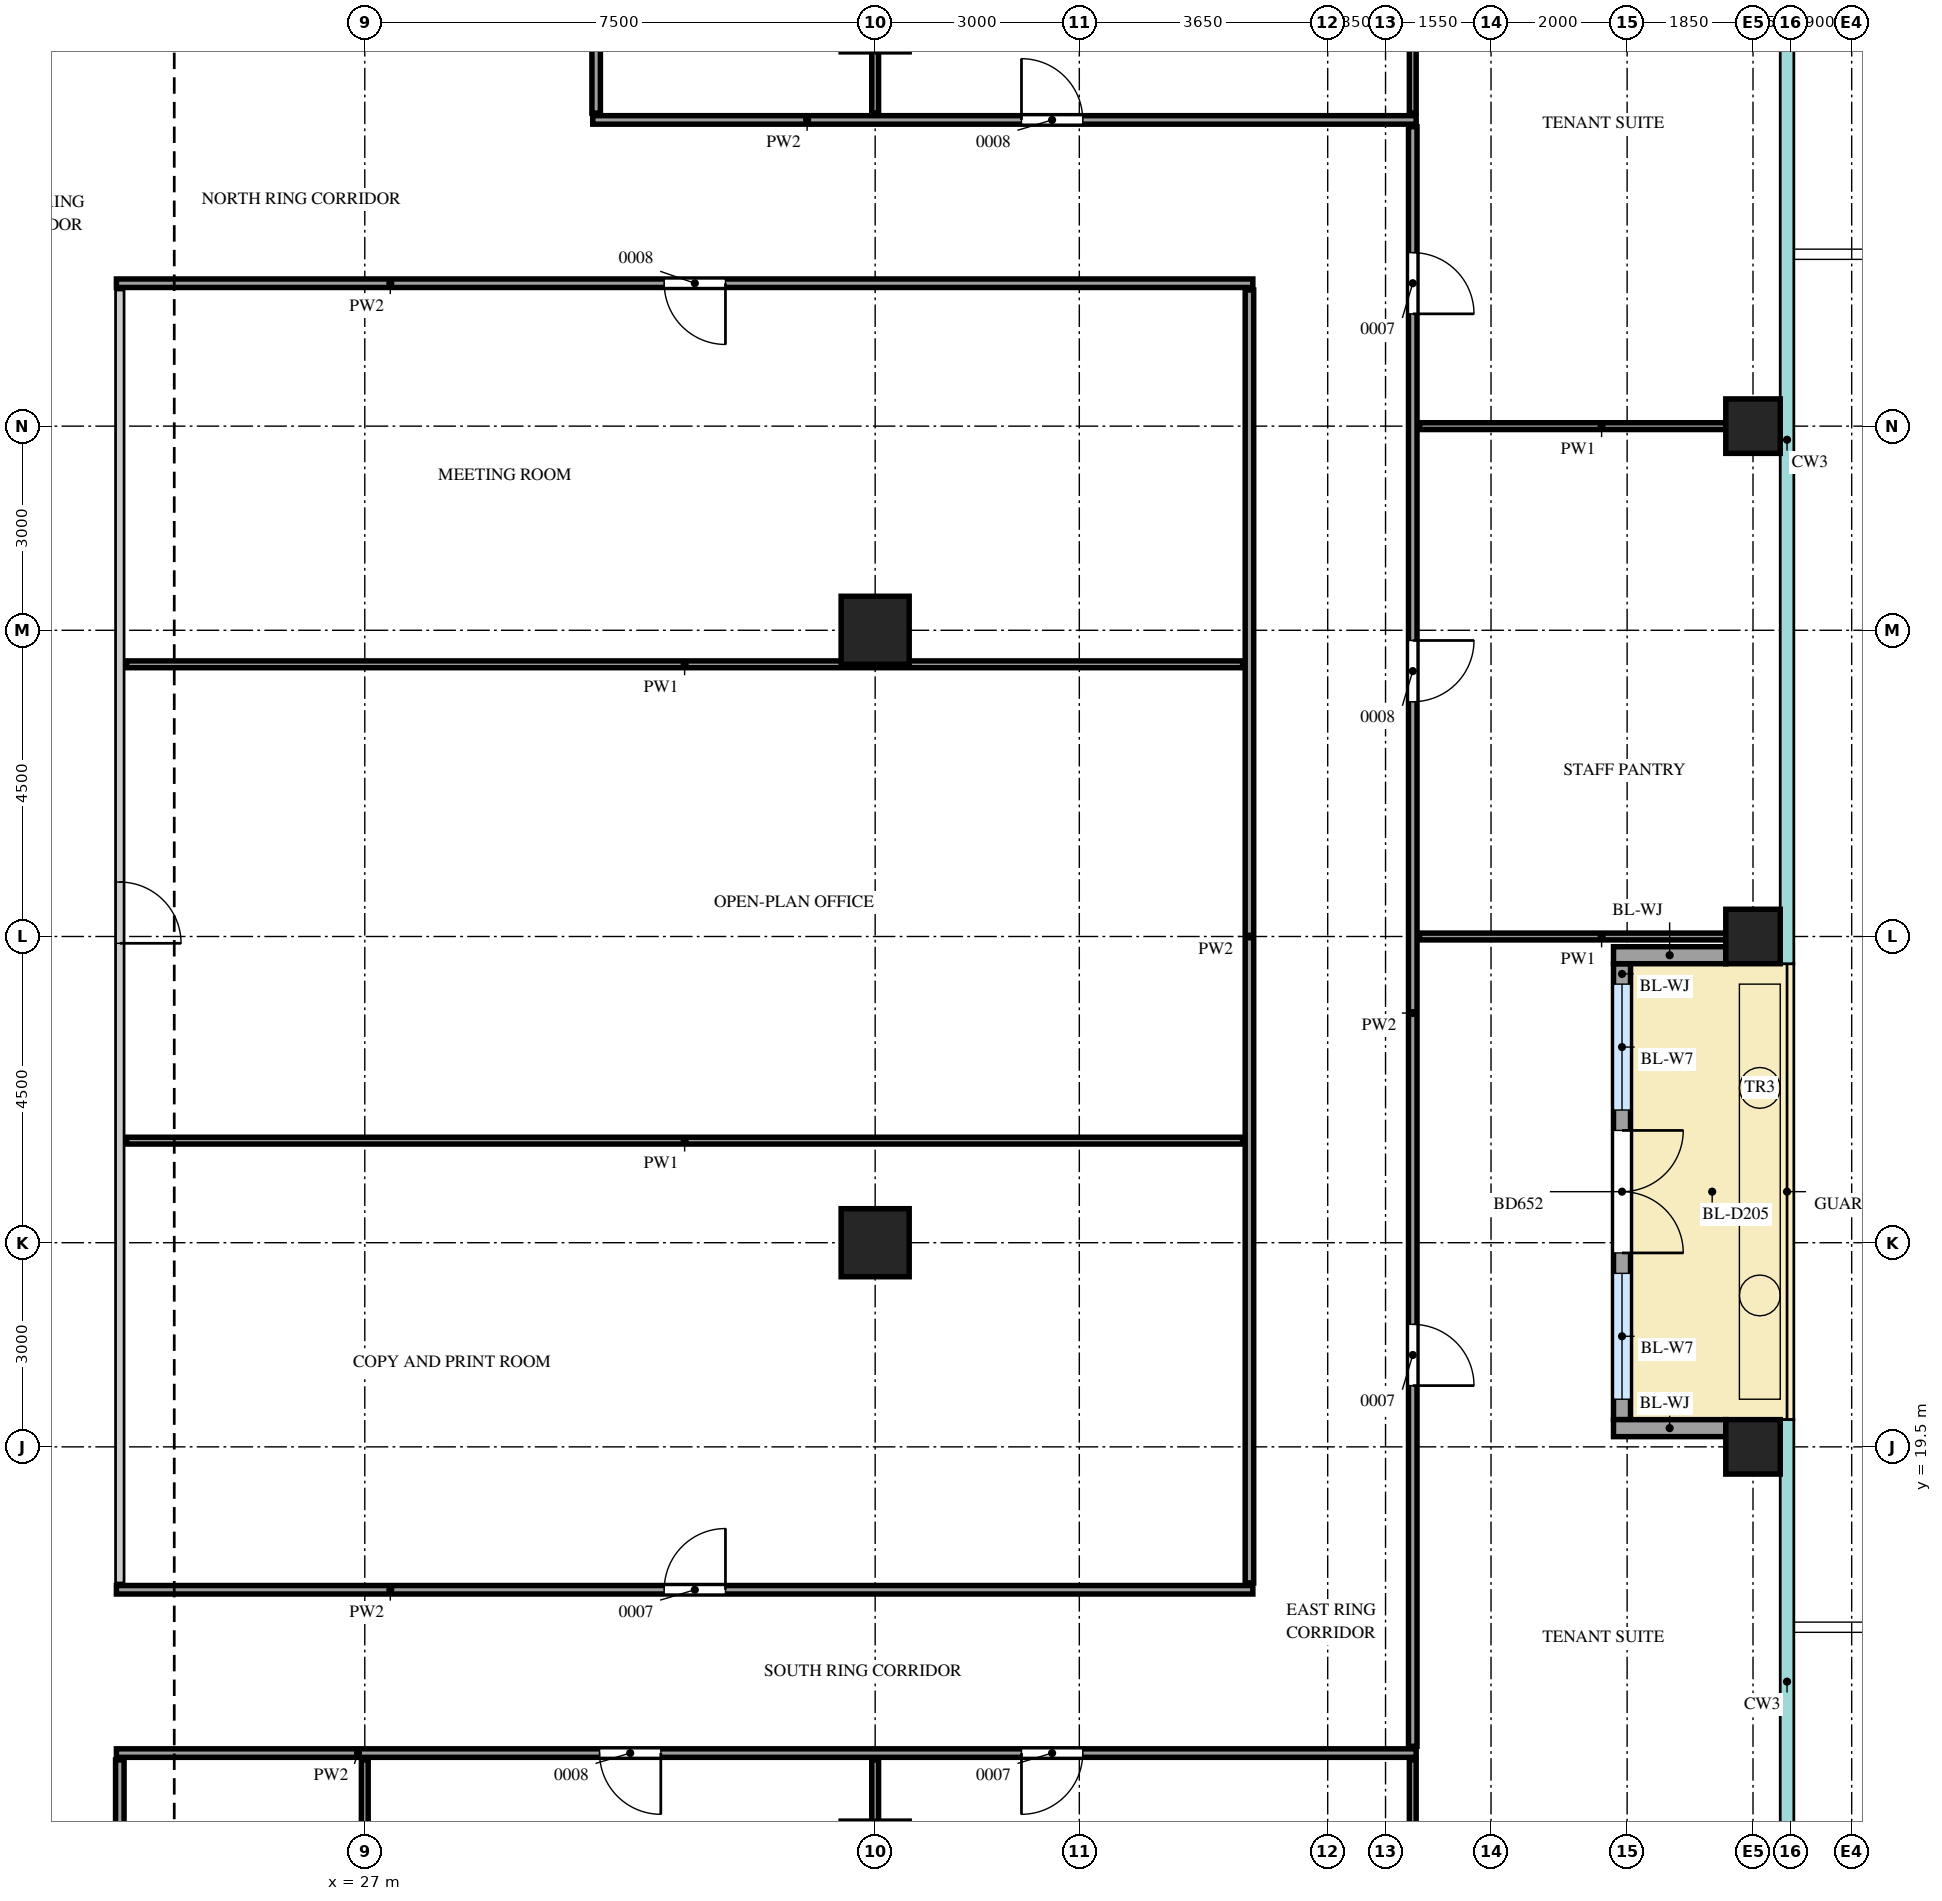
"""IFC4 building model, lengths in metres.
Left out: names, types, materials, properties, quantities, classifications, styles, units other than length and angle.
Written with IfcOpenShell. Run it as: python <this file> out.ifc"""

import sys

from ifc_helpers import new_model, si_unit, direction, frame, frame_2d, origin, origin_2d, place, context, subcontext, project, spatial, rectangle, extrude, source, transform, mapped, element, fill, save


model = new_model("IFC4")
c1 = context("Model", 3, precision=1e-05, world=origin(), true_north=direction((0.0, 1.0)))
c2 = subcontext(c1, "Body", "Model", "MODEL_VIEW")
j1 = project(units=[si_unit("LENGTHUNIT", "METRE"), si_unit("PLANEANGLEUNIT", "RADIAN")], contexts=[c1])
p1 = place(None, origin())
s1 = spatial("IfcSite", under=j1, at=p1, CompositionType="ELEMENT")
p2 = place(p1, origin())
s2 = spatial("IfcBuilding", under=s1, at=p2, CompositionType="ELEMENT")
p3 = place(p2, frame((0.0, 0.0, 290.2)))
s3 = spatial("IfcBuildingStorey", under=s2, at=p3, CompositionType="ELEMENT", Elevation=290.2)
m1 = source(origin(), c2, "Body", "SweptSolid", [
    extrude(rectangle(XDim=0.8, YDim=0.8, at=origin_2d()), origin(), (0.0, 0.0, 1.0), 3.75),
])
for number, where, z_axis, x_axis in (
    (1, (47.4, 19.5, 0.0), (0.0, 0.0, 1.0), (1.0, 0.0, 0.0)),
    (2, (47.4, 27.0, 0.0), (0.0, 0.0, 1.0), (1.0, 0.0, 0.0)),
    (3, (47.4, 34.5, 0.0), (0.0, 0.0, 1.0), (1.0, 0.0, 0.0)),
):
    element("IfcColumn", number, at=place(p3, frame(where, z_axis=z_axis, x_axis=x_axis)), inside=s3, PredefinedType="COLUMN", context=c2, shape_type="MappedRepresentation", body=[
        mapped(m1, transform((0.0, 0.0, 0.0))),
    ])
m2 = source(origin(), c2, "Body", "SweptSolid", [
    extrude(rectangle(XDim=1.0, YDim=1.0, at=origin_2d()), origin(), (0.0, 0.0, 1.0), 3.75),
])
for number, where, z_axis, x_axis in (
    (4, (34.5, 22.5, 0.0), (0.0, 0.0, 1.0), (1.0, 0.0, 0.0)),
    (5, (34.5, 31.5, 0.0), (0.0, 0.0, 1.0), (1.0, 0.0, 0.0)),
):
    element("IfcColumn", number, at=place(p3, frame(where, z_axis=z_axis, x_axis=x_axis)), inside=s3, PredefinedType="COLUMN", context=c2, shape_type="MappedRepresentation", body=[
        mapped(m2, transform((0.0, 0.0, 0.0))),
    ])
m3 = source(origin(), c2, "Body", "SweptSolid", [
    extrude(rectangle(XDim=6.7, YDim=0.25, at=frame_2d((3.35, 0.0))), origin(), (0.0, 0.0, 1.0), 3.2),
])
p4 = place(p3, frame((45.475, 19.9, 0.0), z_axis=(0.0, 0.0, 1.0), x_axis=(0.0, 1.0, 0.0)))
e6 = element("IfcWall", 6, at=p4, inside=s3, PredefinedType="SOLIDWALL", context=c2, shape_type="MappedRepresentation", body=[
    mapped(m3, transform((0.0, 0.0, 0.0))),
])
m4 = source(origin(), c2, "Body", "SweptSolid", [
    extrude(rectangle(XDim=1.85, YDim=2.4, at=frame_2d((0.925, 1.2))), frame((0.0, 0.135, 0.0), z_axis=(0.0, -1.0, 0.0), x_axis=(1.0, 0.0, 0.0)), (0.0, 0.0, 1.0), 0.27),
])
p5 = place(p4, frame((0.3, 0.0, 0.0)))
e7 = element("IfcOpeningElement", 7, at=p5, cuts=e6, PredefinedType="OPENING", context=c2, shape_type="MappedRepresentation", body=[
    mapped(m4, transform((0.0, 0.0, 0.0))),
])
p6 = place(p4, frame((4.55, 0.0, 0.0)))
e8 = element("IfcOpeningElement", 8, at=p6, cuts=e6, PredefinedType="OPENING", context=c2, shape_type="MappedRepresentation", body=[
    mapped(m4, transform((0.0, 0.0, 0.0))),
])
m5 = source(origin(), c2, "Body", "SweptSolid", [
    extrude(rectangle(XDim=1.8, YDim=2.4, at=frame_2d((0.9, 1.2))), frame((0.0, 0.135, 0.0), z_axis=(0.0, -1.0, 0.0), x_axis=(1.0, 0.0, 0.0)), (0.0, 0.0, 1.0), 0.27),
])
p7 = place(p4, frame((2.45, 0.0, 0.0)))
e9 = element("IfcOpeningElement", 9, at=p7, cuts=e6, PredefinedType="OPENING", context=c2, shape_type="MappedRepresentation", body=[
    mapped(m5, transform((0.0, 0.0, 0.0))),
])
m6 = source(origin(), c2, "Body", "SweptSolid", [
    extrude(rectangle(XDim=1.65, YDim=0.25, at=frame_2d((0.825, 0.0))), origin(), (0.0, 0.0, 1.0), 3.2),
])
for number, where, z_axis, x_axis in (
    (10, (47.0, 19.775, 0.0), (0.0, 0.0, 1.0), (-1.0, 0.0, 0.0)),
    (11, (47.0, 26.725, 0.0), (0.0, 0.0, 1.0), (-1.0, 0.0, 0.0)),
):
    element("IfcWall", number, at=place(p3, frame(where, z_axis=z_axis, x_axis=x_axis)), inside=s3, PredefinedType="SOLIDWALL", context=c2, shape_type="MappedRepresentation", body=[
        mapped(m6, transform((0.0, 0.0, 0.0))),
    ])
m7 = source(origin(), c2, "Body", "SweptSolid", [
    extrude(rectangle(XDim=8.75, YDim=0.125, at=frame_2d((4.375, 0.0))), origin(), (0.0, 0.0, 1.0), 3.8),
])
p8 = place(p3, frame((23.4, 6.15, 0.0), z_axis=(0.0, 0.0, 1.0), x_axis=(0.0, 1.0, 0.0)))
e12 = element("IfcWall", 12, at=p8, inside=s3, PredefinedType="PARTITIONING", context=c2, shape_type="MappedRepresentation", body=[
    mapped(m7, transform((0.0, 0.0, 0.0))),
])
m8 = source(origin(), c2, "Body", "SweptSolid", [
    extrude(rectangle(XDim=0.9, YDim=2.1, at=frame_2d((0.45, 1.05))), frame((0.0, 0.073, 0.0), z_axis=(0.0, -1.0, 0.0), x_axis=(1.0, 0.0, 0.0)), (0.0, 0.0, 1.0), 0.145),
])
p9 = place(p8, frame((2.25, 0.0, 0.0)))
e13 = element("IfcOpeningElement", 13, at=p9, cuts=e12, PredefinedType="OPENING", context=c2, shape_type="MappedRepresentation", body=[
    mapped(m8, transform((0.0, 0.0, 0.0))),
])
m9 = source(origin(), c2, "Body", "SweptSolid", [
    extrude(rectangle(XDim=8.75, YDim=0.1, at=frame_2d((4.375, 0.0))), origin(), (0.0, 0.0, 1.0), 3.35),
])
for number, where, z_axis, x_axis in (
    (14, (27.0, 6.15, 0.0), (0.0, 0.0, 1.0), (0.0, 1.0, 0.0)),
    (15, (34.5, 6.15, 0.0), (0.0, 0.0, 1.0), (0.0, 1.0, 0.0)),
):
    element("IfcWall", number, at=place(p3, frame(where, z_axis=z_axis, x_axis=x_axis)), inside=s3, PredefinedType="PARTITIONING", context=c2, shape_type="MappedRepresentation", body=[
        mapped(m9, transform((0.0, 0.0, 0.0))),
    ])
m10 = source(origin(), c2, "Body", "SweptSolid", [
    extrude(rectangle(XDim=2.75, YDim=0.1, at=frame_2d((1.375, 0.0))), origin(), (0.0, 0.0, 1.0), 3.8),
])
p10 = place(p3, frame((42.4, 12.15, 0.0), z_axis=(0.0, 0.0, 1.0), x_axis=(0.0, 1.0, 0.0)))
e16 = element("IfcWall", 16, at=p10, inside=s3, PredefinedType="PARTITIONING", context=c2, shape_type="MappedRepresentation", body=[
    mapped(m10, transform((0.0, 0.0, 0.0))),
])
m11 = source(origin(), c2, "Body", "SweptSolid", [
    extrude(rectangle(XDim=19.1, YDim=0.125, at=frame_2d((9.55, 0.0))), origin(), (0.0, 0.0, 1.0), 3.8),
])
p11 = place(p3, frame((23.35, 15.0, 0.0), z_axis=(0.0, 0.0, 1.0), x_axis=(1.0, 0.0, 0.0)))
e17 = element("IfcWall", 17, at=p11, inside=s3, PredefinedType="PARTITIONING", context=c2, shape_type="MappedRepresentation", body=[
    mapped(m11, transform((0.0, 0.0, 0.0))),
])
p12 = place(p11, frame((7.1, 0.0, 0.0)))
e18 = element("IfcOpeningElement", 18, at=p12, cuts=e17, PredefinedType="OPENING", context=c2, shape_type="MappedRepresentation", body=[
    mapped(m8, transform((0.0, 0.0, 0.0))),
])
p13 = place(p11, frame((13.3, 0.0, 0.0)))
e19 = element("IfcOpeningElement", 19, at=p13, cuts=e17, PredefinedType="OPENING", context=c2, shape_type="MappedRepresentation", body=[
    mapped(m8, transform((0.0, 0.0, 0.0))),
])
m12 = source(origin(), c2, "Body", "SweptSolid", [
    extrude(rectangle(XDim=23.8, YDim=0.125, at=frame_2d((11.9, 0.0))), origin(), (0.0, 0.0, 1.0), 3.8),
])
p14 = place(p3, frame((42.4, 15.1, 0.0), z_axis=(0.0, 0.0, 1.0), x_axis=(0.0, 1.0, 0.0)))
e20 = element("IfcWall", 20, at=p14, inside=s3, PredefinedType="PARTITIONING", context=c2, shape_type="MappedRepresentation", body=[
    mapped(m12, transform((0.0, 0.0, 0.0))),
])
p15 = place(p14, frame((5.3, 0.0, 0.0)))
e21 = element("IfcOpeningElement", 21, at=p15, cuts=e20, PredefinedType="OPENING", context=c2, shape_type="MappedRepresentation", body=[
    mapped(m8, transform((0.0, 0.0, 0.0))),
])
p16 = place(p14, frame((15.35, 0.0, 0.0)))
e22 = element("IfcOpeningElement", 22, at=p16, cuts=e20, PredefinedType="OPENING", context=c2, shape_type="MappedRepresentation", body=[
    mapped(m8, transform((0.0, 0.0, 0.0))),
])
p17 = place(p14, frame((21.05, 0.0, 0.0)))
e23 = element("IfcOpeningElement", 23, at=p17, cuts=e20, PredefinedType="OPENING", context=c2, shape_type="MappedRepresentation", body=[
    mapped(m8, transform((0.0, 0.0, 0.0))),
])
m13 = source(origin(), c2, "Body", "SweptSolid", [
    extrude(rectangle(XDim=16.7, YDim=0.125, at=frame_2d((8.35, 0.0))), origin(), (0.0, 0.0, 1.0), 3.8),
])
p18 = place(p3, frame((23.35, 17.4, 0.0), z_axis=(0.0, 0.0, 1.0), x_axis=(1.0, 0.0, 0.0)))
e24 = element("IfcWall", 24, at=p18, inside=s3, PredefinedType="PARTITIONING", context=c2, shape_type="MappedRepresentation", body=[
    mapped(m13, transform((0.0, 0.0, 0.0))),
])
p19 = place(p18, frame((8.05, 0.0, 0.0)))
e25 = element("IfcOpeningElement", 25, at=p19, cuts=e24, PredefinedType="OPENING", context=c2, shape_type="MappedRepresentation", body=[
    mapped(m8, transform((0.0, 0.0, 0.0))),
])
m14 = source(origin(), c2, "Body", "SweptSolid", [
    extrude(rectangle(XDim=19.0, YDim=0.125, at=frame_2d((9.5, 0.0))), origin(), (0.0, 0.0, 1.0), 3.8),
])
p20 = place(p3, frame((23.4, 17.5, 0.0), z_axis=(0.0, 0.0, 1.0), x_axis=(0.0, 1.0, 0.0)))
e26 = element("IfcWall", 26, at=p20, inside=s3, PredefinedType="PARTITIONING", context=c2, shape_type="MappedRepresentation", body=[
    mapped(m14, transform((0.0, 0.0, 0.0))),
])
p21 = place(p20, frame((9.4, 0.0, 0.0)))
e27 = element("IfcOpeningElement", 27, at=p21, cuts=e26, PredefinedType="OPENING", context=c2, shape_type="MappedRepresentation", body=[
    mapped(m8, transform((0.0, 0.0, 0.0))),
])
p22 = place(p3, frame((40.0, 17.5, 0.0), z_axis=(0.0, 0.0, 1.0), x_axis=(0.0, 1.0, 0.0)))
e28 = element("IfcWall", 28, at=p22, inside=s3, PredefinedType="PARTITIONING", context=c2, shape_type="MappedRepresentation", body=[
    mapped(m14, transform((0.0, 0.0, 0.0))),
])
m15 = source(origin(), c2, "Body", "SweptSolid", [
    extrude(rectangle(XDim=16.4, YDim=0.1, at=frame_2d((8.2, 0.0))), origin(), (0.0, 0.0, 1.0), 3.8),
])
p23 = place(p3, frame((23.5, 24.0, 0.0), z_axis=(0.0, 0.0, 1.0), x_axis=(1.0, 0.0, 0.0)))
e29 = element("IfcWall", 29, at=p23, inside=s3, PredefinedType="PARTITIONING", context=c2, shape_type="MappedRepresentation", body=[
    mapped(m15, transform((0.0, 0.0, 0.0))),
])
m16 = source(origin(), c2, "Body", "SweptSolid", [
    extrude(rectangle(XDim=5.35, YDim=0.1, at=frame_2d((2.675, 0.0))), origin(), (0.0, 0.0, 1.0), 3.8),
])
p24 = place(p3, frame((42.5, 27.0, 0.0), z_axis=(0.0, 0.0, 1.0), x_axis=(1.0, 0.0, 0.0)))
e30 = element("IfcWall", 30, at=p24, inside=s3, PredefinedType="PARTITIONING", context=c2, shape_type="MappedRepresentation", body=[
    mapped(m16, transform((0.0, 0.0, 0.0))),
])
p25 = place(p3, frame((23.5, 31.0, 0.0), z_axis=(0.0, 0.0, 1.0), x_axis=(1.0, 0.0, 0.0)))
e31 = element("IfcWall", 31, at=p25, inside=s3, PredefinedType="PARTITIONING", context=c2, shape_type="MappedRepresentation", body=[
    mapped(m15, transform((0.0, 0.0, 0.0))),
])
p26 = place(p3, frame((42.5, 34.5, 0.0), z_axis=(0.0, 0.0, 1.0), x_axis=(1.0, 0.0, 0.0)))
e32 = element("IfcWall", 32, at=p26, inside=s3, PredefinedType="PARTITIONING", context=c2, shape_type="MappedRepresentation", body=[
    mapped(m16, transform((0.0, 0.0, 0.0))),
])
p27 = place(p3, frame((23.35, 36.6, 0.0), z_axis=(0.0, 0.0, 1.0), x_axis=(1.0, 0.0, 0.0)))
e33 = element("IfcWall", 33, at=p27, inside=s3, PredefinedType="PARTITIONING", context=c2, shape_type="MappedRepresentation", body=[
    mapped(m13, transform((0.0, 0.0, 0.0))),
])
p28 = place(p27, frame((8.05, 0.0, 0.0)))
e34 = element("IfcOpeningElement", 34, at=p28, cuts=e33, PredefinedType="OPENING", context=c2, shape_type="MappedRepresentation", body=[
    mapped(m8, transform((0.0, 0.0, 0.0))),
])
m17 = source(origin(), c2, "Body", "SweptSolid", [
    extrude(rectangle(XDim=12.1, YDim=0.125, at=frame_2d((6.05, 0.0))), origin(), (0.0, 0.0, 1.0), 3.8),
])
p29 = place(p3, frame((30.35, 39.0, 0.0), z_axis=(0.0, 0.0, 1.0), x_axis=(1.0, 0.0, 0.0)))
e35 = element("IfcWall", 35, at=p29, inside=s3, PredefinedType="PARTITIONING", context=c2, shape_type="MappedRepresentation", body=[
    mapped(m17, transform((0.0, 0.0, 0.0))),
])
p30 = place(p29, frame((6.3, 0.0, 0.0)))
e36 = element("IfcOpeningElement", 36, at=p30, cuts=e35, PredefinedType="OPENING", context=c2, shape_type="MappedRepresentation", body=[
    mapped(m8, transform((0.0, 0.0, 0.0))),
])
p31 = place(p3, frame((30.4, 39.1, 0.0), z_axis=(0.0, 0.0, 1.0), x_axis=(0.0, 1.0, 0.0)))
e37 = element("IfcWall", 37, at=p31, inside=s3, PredefinedType="PARTITIONING", context=c2, shape_type="MappedRepresentation", body=[
    mapped(m7, transform((0.0, 0.0, 0.0))),
])
p32 = place(p31, frame((2.9, 0.0, 0.0)))
e38 = element("IfcOpeningElement", 38, at=p32, cuts=e37, PredefinedType="OPENING", context=c2, shape_type="MappedRepresentation", body=[
    mapped(m8, transform((0.0, 0.0, 0.0))),
])
p33 = place(p3, frame((34.5, 39.1, 0.0), z_axis=(0.0, 0.0, 1.0), x_axis=(0.0, 1.0, 0.0)))
e39 = element("IfcWall", 39, at=p33, inside=s3, PredefinedType="PARTITIONING", context=c2, shape_type="MappedRepresentation", body=[
    mapped(m9, transform((0.0, 0.0, 0.0))),
])
p34 = place(p3, frame((42.4, 39.1, 0.0), z_axis=(0.0, 0.0, 1.0), x_axis=(0.0, 1.0, 0.0)))
e40 = element("IfcWall", 40, at=p34, inside=s3, PredefinedType="PARTITIONING", context=c2, shape_type="MappedRepresentation", body=[
    mapped(m10, transform((0.0, 0.0, 0.0))),
])
m18 = source(origin(), c2, "Body", "SweptSolid", [
    extrude(rectangle(XDim=1.85, YDim=2.4, at=frame_2d((0.925, 1.2))), frame((0.0, 0.03, 0.0), z_axis=(0.0, -1.0, 0.0), x_axis=(1.0, 0.0, 0.0)), (0.0, 0.0, 1.0), 0.06),
])
p35 = place(p5, origin())
e41 = element("IfcWindow", 41, at=p35, inside=s3, PartitioningType="SINGLE_PANEL", PredefinedType="WINDOW", context=c2, shape_type="MappedRepresentation", body=[
    mapped(m18, transform((0.0, 0.0, 0.0))),
])
fill(e7, e41)
p36 = place(p6, origin())
e42 = element("IfcWindow", 42, at=p36, inside=s3, PartitioningType="SINGLE_PANEL", PredefinedType="WINDOW", context=c2, shape_type="MappedRepresentation", body=[
    mapped(m18, transform((0.0, 0.0, 0.0))),
])
fill(e8, e42)
m19 = source(origin(), c2, "Body", "SweptSolid", [
    extrude(rectangle(XDim=1.8, YDim=2.4, at=frame_2d((0.9, 1.2))), frame((0.0, 0.025, 0.0), z_axis=(0.0, -1.0, 0.0), x_axis=(1.0, 0.0, 0.0)), (0.0, 0.0, 1.0), 0.05),
])
p37 = place(p7, origin())
e43 = element("IfcDoor", 43, at=p37, inside=s3, OperationType="DOUBLE_DOOR_DOUBLE_SWING", PredefinedType="DOOR", context=c2, shape_type="MappedRepresentation", body=[
    mapped(m19, transform((0.0, 0.0, 0.0))),
])
fill(e9, e43)
m20 = source(origin(), c2, "Body", "SweptSolid", [
    extrude(rectangle(XDim=0.9, YDim=2.1, at=frame_2d((0.45, 1.05))), frame((0.0, 0.025, 0.0), z_axis=(0.0, -1.0, 0.0), x_axis=(1.0, 0.0, 0.0)), (0.0, 0.0, 1.0), 0.05),
])
p38 = place(p12, origin())
e44 = element("IfcDoor", 44, at=p38, inside=s3, OperationType="SINGLE_SWING_RIGHT", PredefinedType="DOOR", context=c2, shape_type="MappedRepresentation", body=[
    mapped(m20, transform((0.0, 0.0, 0.0))),
])
fill(e18, e44)
p39 = place(p13, origin())
e45 = element("IfcDoor", 45, at=p39, inside=s3, OperationType="SINGLE_SWING_LEFT", PredefinedType="DOOR", context=c2, shape_type="MappedRepresentation", body=[
    mapped(m20, transform((0.0, 0.0, 0.0))),
])
fill(e19, e45)
p40 = place(p15, origin())
e46 = element("IfcDoor", 46, at=p40, inside=s3, OperationType="SINGLE_SWING_LEFT", PredefinedType="DOOR", context=c2, shape_type="MappedRepresentation", body=[
    mapped(m20, transform((0.0, 0.0, 0.0))),
])
fill(e21, e46)
p41 = place(p16, origin())
e47 = element("IfcDoor", 47, at=p41, inside=s3, OperationType="SINGLE_SWING_RIGHT", PredefinedType="DOOR", context=c2, shape_type="MappedRepresentation", body=[
    mapped(m20, transform((0.0, 0.0, 0.0))),
])
fill(e22, e47)
p42 = place(p17, origin())
e48 = element("IfcDoor", 48, at=p42, inside=s3, OperationType="SINGLE_SWING_LEFT", PredefinedType="DOOR", context=c2, shape_type="MappedRepresentation", body=[
    mapped(m20, transform((0.0, 0.0, 0.0))),
])
fill(e23, e48)
p43 = place(p30, origin())
e49 = element("IfcDoor", 49, at=p43, inside=s3, OperationType="SINGLE_SWING_RIGHT", PredefinedType="DOOR", context=c2, shape_type="MappedRepresentation", body=[
    mapped(m20, transform((0.0, 0.0, 0.0))),
])
fill(e36, e49)
p44 = place(p19, origin())
e50 = element("IfcDoor", 50, at=p44, inside=s3, OperationType="SINGLE_SWING_LEFT", PredefinedType="DOOR", context=c2, shape_type="MappedRepresentation", body=[
    mapped(m20, transform((0.0, 0.0, 0.0))),
])
fill(e25, e50)
p45 = place(p21, origin())
e51 = element("IfcDoor", 51, at=p45, inside=s3, OperationType="SINGLE_SWING_LEFT", PredefinedType="DOOR", context=c2, shape_type="MappedRepresentation", body=[
    mapped(m20, transform((0.0, 0.0, 0.0))),
])
fill(e27, e51)
p46 = place(p28, origin())
e52 = element("IfcDoor", 52, at=p46, inside=s3, OperationType="SINGLE_SWING_RIGHT", PredefinedType="DOOR", context=c2, shape_type="MappedRepresentation", body=[
    mapped(m20, transform((0.0, 0.0, 0.0))),
])
fill(e34, e52)
save(model, sys.argv[1])
